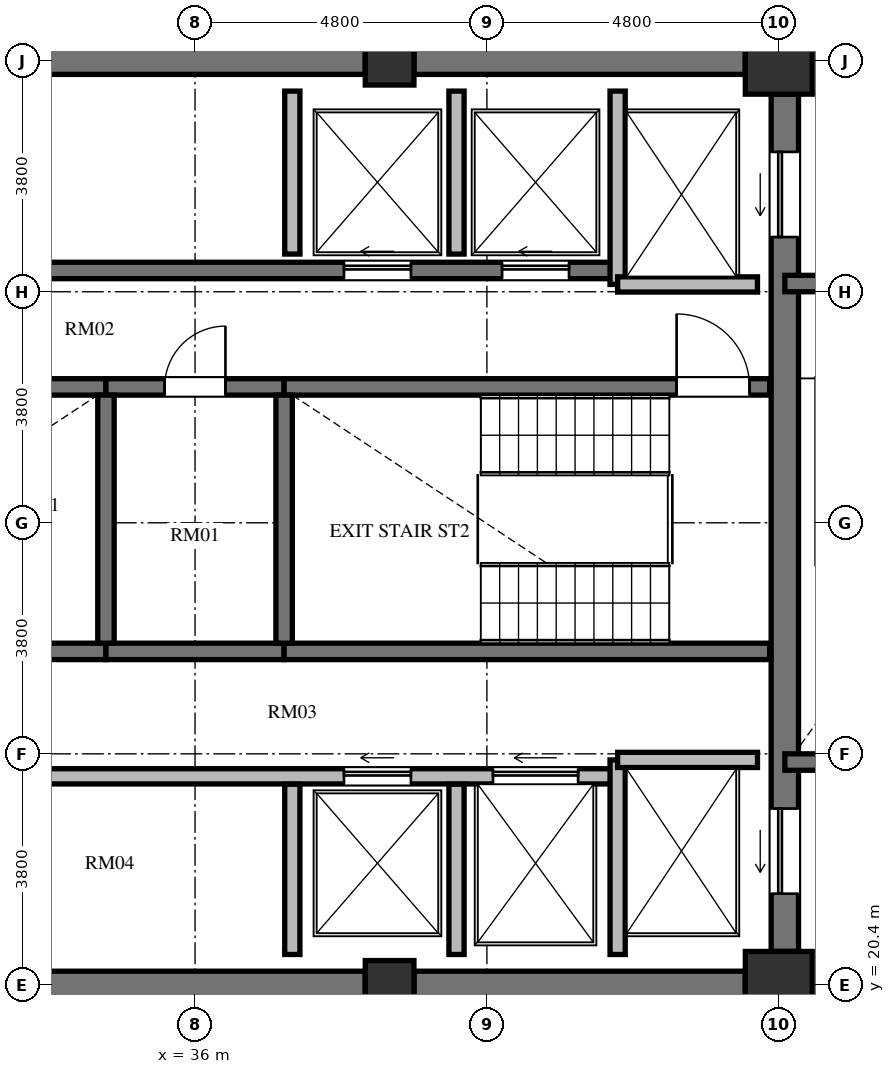
"""IFC4 building model, lengths in metres.
Left out: names, types, materials, properties, quantities, classifications, styles, units other than length and angle.
Written with IfcOpenShell. Run it as: python <this file> out.ifc"""

import sys

from ifc_helpers import new_model, si_unit, direction, frame, frame_2d, origin, origin_2d, place, context, subcontext, project, spatial, rectangle, extrude, element, fill, save


model = new_model("IFC4")
c1 = context("Model", 3, precision=1e-05, world=origin(), true_north=direction((0.0, 1.0)))
c2 = subcontext(c1, "Body", "Model", "MODEL_VIEW")
j1 = project(units=[si_unit("LENGTHUNIT", "METRE"), si_unit("PLANEANGLEUNIT", "RADIAN")], contexts=[c1])
p1 = place(None, origin())
s1 = spatial("IfcSite", under=j1, at=p1, CompositionType="ELEMENT")
p2 = place(p1, origin())
s2 = spatial("IfcBuilding", under=s1, at=p2, CompositionType="ELEMENT")
p3 = place(p2, frame((0.0, 0.0, 269.616)))
s3 = spatial("IfcBuildingStorey", under=s2, at=p3, CompositionType="ELEMENT", Elevation=269.616)
p4 = place(p3, frame((39.2, 20.4, 0.0), z_axis=(0.0, 0.0, 1.0), x_axis=(1.0, 0.0, 0.0)))
e1 = element("IfcColumn", 1, at=p4, inside=s3, PredefinedType="COLUMN", context=c2, shape_type="SweptSolid", body=[
    extrude(rectangle(XDim=0.8, YDim=0.8, at=origin_2d()), origin(), (0.0, 0.0, 1.0), 3.648),
])
for number, where, z_axis, x_axis in (
    (2, (45.6, 20.4, 0.0), (0.0, 0.0, 1.0), (1.0, 0.0, 0.0)),
    (3, (45.6, 35.6, 0.0), (0.0, 0.0, 1.0), (1.0, 0.0, 0.0)),
):
    element("IfcColumn", number, at=place(p3, frame(where, z_axis=z_axis, x_axis=x_axis)), inside=s3, PredefinedType="COLUMN", context=c2, shape_type="SweptSolid", body=[
        extrude(rectangle(XDim=1.1, YDim=1.1, at=origin_2d()), origin(), (0.0, 0.0, 1.0), 3.648),
    ])
p5 = place(p3, frame((39.2, 35.6, 0.0), z_axis=(0.0, 0.0, 1.0), x_axis=(1.0, 0.0, 0.0)))
e4 = element("IfcColumn", 4, at=p5, inside=s3, PredefinedType="COLUMN", context=c2, shape_type="SweptSolid", body=[
    extrude(rectangle(XDim=0.8, YDim=0.8, at=origin_2d()), origin(), (0.0, 0.0, 1.0), 3.648),
])
p6 = place(p3, frame((45.7, 20.95, 0.0), z_axis=(0.0, 0.0, 1.0), x_axis=(0.0, 1.0, 0.0)))
e5 = element("IfcWall", 5, at=p6, inside=s3, PredefinedType="SHEAR", context=c2, shape_type="SweptSolid", body=[
    extrude(rectangle(XDim=14.1, YDim=0.45, at=frame_2d((7.05, 0.0))), origin(), (0.0, 0.0, 1.0), 3.648),
])
p7 = place(p6, frame((11.75, 0.0, 0.0)))
e6 = element("IfcOpeningElement", 6, at=p7, cuts=e5, PredefinedType="OPENING", context=c2, shape_type="SweptSolid", body=[
    extrude(rectangle(XDim=1.4, YDim=2.3, at=frame_2d((0.7, 1.15))), frame((0.0, 0.235, 0.0), z_axis=(0.0, -1.0, 0.0), x_axis=(1.0, 0.0, 0.0)), (0.0, 0.0, 1.0), 0.47),
])
p8 = place(p6, frame((0.95, 0.0, 0.0)))
e7 = element("IfcOpeningElement", 7, at=p8, cuts=e5, PredefinedType="OPENING", context=c2, shape_type="SweptSolid", body=[
    extrude(rectangle(XDim=1.4, YDim=2.3, at=frame_2d((0.7, 1.15))), frame((0.0, 0.235, 0.0), z_axis=(0.0, -1.0, 0.0), x_axis=(1.0, 0.0, 0.0)), (0.0, 0.0, 1.0), 0.47),
])
for number, where, z_axis, x_axis in (
    (8, (33.2, 20.4, 0.0), (0.0, 0.0, 1.0), (1.0, 0.0, 0.0)),
    (9, (33.2, 35.6, 0.0), (0.0, 0.0, 1.0), (1.0, 0.0, 0.0)),
):
    element("IfcWall", number, at=place(p3, frame(where, z_axis=z_axis, x_axis=x_axis)), inside=s3, PredefinedType="SHEAR", context=c2, shape_type="SweptSolid", body=[
        extrude(rectangle(XDim=5.6, YDim=0.45, at=frame_2d((2.8, 0.0))), origin(), (0.0, 0.0, 1.0), 3.648),
    ])
for number, where, z_axis, x_axis in (
    (10, (39.6, 20.4, 0.0), (0.0, 0.0, 1.0), (1.0, 0.0, 0.0)),
    (11, (39.6, 35.6, 0.0), (0.0, 0.0, 1.0), (1.0, 0.0, 0.0)),
):
    element("IfcWall", number, at=place(p3, frame(where, z_axis=z_axis, x_axis=x_axis)), inside=s3, PredefinedType="SHEAR", context=c2, shape_type="SweptSolid", body=[
        extrude(rectangle(XDim=5.45, YDim=0.45, at=frame_2d((2.725, 0.0))), origin(), (0.0, 0.0, 1.0), 3.648),
    ])
p9 = place(p3, frame((26.55, 30.235, 0.0), z_axis=(0.0, 0.0, 1.0), x_axis=(1.0, 0.0, 0.0)))
e12 = element("IfcWall", 12, at=p9, inside=s3, PredefinedType="SHEAR", context=c2, shape_type="SweptSolid", body=[
    extrude(rectangle(XDim=7.985, YDim=0.27, at=frame_2d((3.992, 0.0))), origin(), (0.0, 0.0, 1.0), 3.648),
])
p10 = place(p3, frame((34.535, 30.235, 0.0), z_axis=(0.0, 0.0, 1.0), x_axis=(1.0, 0.0, 0.0)))
e13 = element("IfcWall", 13, at=p10, inside=s3, PredefinedType="SHEAR", context=c2, shape_type="SweptSolid", body=[
    extrude(rectangle(XDim=2.93, YDim=0.27, at=frame_2d((1.465, 0.0))), origin(), (0.0, 0.0, 1.0), 3.648),
])
p11 = place(p10, frame((0.965, 0.0, 0.0)))
e14 = element("IfcOpeningElement", 14, at=p11, cuts=e13, PredefinedType="OPENING", context=c2, shape_type="SweptSolid", body=[
    extrude(rectangle(XDim=1.0, YDim=2.1, at=frame_2d((0.5, 1.05))), frame((0.0, 0.145, 0.0), z_axis=(0.0, -1.0, 0.0), x_axis=(1.0, 0.0, 0.0)), (0.0, 0.0, 1.0), 0.29),
])
p12 = place(p3, frame((37.465, 30.235, 0.0), z_axis=(0.0, 0.0, 1.0), x_axis=(1.0, 0.0, 0.0)))
e15 = element("IfcWall", 15, at=p12, inside=s3, PredefinedType="SHEAR", context=c2, shape_type="SweptSolid", body=[
    extrude(rectangle(XDim=7.985, YDim=0.27, at=frame_2d((3.992, 0.0))), origin(), (0.0, 0.0, 1.0), 3.648),
])
p13 = place(p12, frame((6.455, 0.0, 0.0)))
e16 = element("IfcOpeningElement", 16, at=p13, cuts=e15, PredefinedType="OPENING", context=c2, shape_type="SweptSolid", body=[
    extrude(rectangle(XDim=1.2, YDim=2.15, at=frame_2d((0.6, 1.075))), frame((0.0, 0.145, 0.0), z_axis=(0.0, -1.0, 0.0), x_axis=(1.0, 0.0, 0.0)), (0.0, 0.0, 1.0), 0.29),
])
p14 = place(p3, frame((26.55, 25.885, 0.0), z_axis=(0.0, 0.0, 1.0), x_axis=(1.0, 0.0, 0.0)))
e17 = element("IfcWall", 17, at=p14, inside=s3, PredefinedType="SHEAR", context=c2, shape_type="SweptSolid", body=[
    extrude(rectangle(XDim=7.985, YDim=0.27, at=frame_2d((3.992, 0.0))), origin(), (0.0, 0.0, 1.0), 3.648),
])
p15 = place(p3, frame((34.535, 25.885, 0.0), z_axis=(0.0, 0.0, 1.0), x_axis=(1.0, 0.0, 0.0)))
e18 = element("IfcWall", 18, at=p15, inside=s3, PredefinedType="SHEAR", context=c2, shape_type="SweptSolid", body=[
    extrude(rectangle(XDim=2.93, YDim=0.27, at=frame_2d((1.465, 0.0))), origin(), (0.0, 0.0, 1.0), 3.648),
])
p16 = place(p3, frame((37.465, 25.885, 0.0), z_axis=(0.0, 0.0, 1.0), x_axis=(1.0, 0.0, 0.0)))
e19 = element("IfcWall", 19, at=p16, inside=s3, PredefinedType="SHEAR", context=c2, shape_type="SweptSolid", body=[
    extrude(rectangle(XDim=7.985, YDim=0.27, at=frame_2d((3.992, 0.0))), origin(), (0.0, 0.0, 1.0), 3.648),
])
for number, where, z_axis, x_axis in (
    (20, (34.535, 26.02, 0.0), (0.0, 0.0, 1.0), (0.0, 1.0, 0.0)),
    (21, (37.465, 26.02, 0.0), (0.0, 0.0, 1.0), (0.0, 1.0, 0.0)),
):
    element("IfcWall", number, at=place(p3, frame(where, z_axis=z_axis, x_axis=x_axis)), inside=s3, PredefinedType="SHEAR", context=c2, shape_type="SweptSolid", body=[
        extrude(rectangle(XDim=4.08, YDim=0.27, at=frame_2d((2.04, 0.0))), origin(), (0.0, 0.0, 1.0), 3.648),
    ])
p17 = place(p3, frame((26.55, 32.15, 0.0), z_axis=(0.0, 0.0, 1.0), x_axis=(1.0, 0.0, 0.0)))
e22 = element("IfcWall", 22, at=p17, inside=s3, PredefinedType="SHEAR", context=c2, shape_type="SweptSolid", body=[
    extrude(rectangle(XDim=16.4, YDim=0.27, at=frame_2d((8.2, 0.0))), origin(), (0.0, 0.0, 1.0), 3.648),
])
p18 = place(p17, frame((5.125, 0.0, 0.0)))
e23 = element("IfcOpeningElement", 23, at=p18, cuts=e22, PredefinedType="OPENING", context=c2, shape_type="SweptSolid", body=[
    extrude(rectangle(XDim=1.05, YDim=2.15, at=frame_2d((0.525, 1.075))), frame((0.0, 0.145, 0.0), z_axis=(0.0, -1.0, 0.0), x_axis=(1.0, 0.0, 0.0)), (0.0, 0.0, 1.0), 0.29),
])
p19 = place(p17, frame((11.9, 0.0, 0.0)))
e24 = element("IfcOpeningElement", 24, at=p19, cuts=e22, PredefinedType="OPENING", context=c2, shape_type="SweptSolid", body=[
    extrude(rectangle(XDim=1.1, YDim=2.2, at=frame_2d((0.55, 1.1))), frame((0.0, 0.145, 0.0), z_axis=(0.0, -1.0, 0.0), x_axis=(1.0, 0.0, 0.0)), (0.0, 0.0, 1.0), 0.29),
])
p20 = place(p17, frame((14.5, 0.0, 0.0)))
e25 = element("IfcOpeningElement", 25, at=p20, cuts=e22, PredefinedType="OPENING", context=c2, shape_type="SweptSolid", body=[
    extrude(rectangle(XDim=1.1, YDim=2.2, at=frame_2d((0.55, 1.1))), frame((0.0, 0.145, 0.0), z_axis=(0.0, -1.0, 0.0), x_axis=(1.0, 0.0, 0.0)), (0.0, 0.0, 1.0), 0.29),
])
p21 = place(p3, frame((26.75, 23.83, 0.0), z_axis=(0.0, 0.0, 1.0), x_axis=(1.0, 0.0, 0.0)))
e26 = element("IfcWall", 26, at=p21, inside=s3, PredefinedType="SOLIDWALL", context=c2, shape_type="SweptSolid", body=[
    extrude(rectangle(XDim=16.2, YDim=0.25, at=frame_2d((8.1, 0.0))), origin(), (0.0, 0.0, 1.0), 3.448),
])
p22 = place(p21, frame((4.75, 0.0, 0.0)))
e27 = element("IfcOpeningElement", 27, at=p22, cuts=e26, PredefinedType="OPENING", context=c2, shape_type="SweptSolid", body=[
    extrude(rectangle(XDim=1.4, YDim=2.2, at=frame_2d((0.7, 1.1))), frame((0.0, 0.135, 0.0), z_axis=(0.0, -1.0, 0.0), x_axis=(1.0, 0.0, 0.0)), (0.0, 0.0, 1.0), 0.27),
])
p23 = place(p21, frame((11.7, 0.0, 0.0)))
e28 = element("IfcOpeningElement", 28, at=p23, cuts=e26, PredefinedType="OPENING", context=c2, shape_type="SweptSolid", body=[
    extrude(rectangle(XDim=1.1, YDim=2.2, at=frame_2d((0.55, 1.1))), frame((0.0, 0.135, 0.0), z_axis=(0.0, -1.0, 0.0), x_axis=(1.0, 0.0, 0.0)), (0.0, 0.0, 1.0), 0.27),
])
p24 = place(p21, frame((14.15, 0.0, 0.0)))
e29 = element("IfcOpeningElement", 29, at=p24, cuts=e26, PredefinedType="OPENING", context=c2, shape_type="SweptSolid", body=[
    extrude(rectangle(XDim=1.4, YDim=2.3, at=frame_2d((0.7, 1.15))), frame((0.0, 0.135, 0.0), z_axis=(0.0, -1.0, 0.0), x_axis=(1.0, 0.0, 0.0)), (0.0, 0.0, 1.0), 0.27),
])
p25 = place(p3, frame((42.95, 31.92, 0.0), z_axis=(0.0, 0.0, 1.0), x_axis=(0.0, 1.0, 0.0)))
e30 = element("IfcWall", 30, at=p25, inside=s3, PredefinedType="SOLIDWALL", context=c2, shape_type="SweptSolid", body=[
    extrude(rectangle(XDim=3.18, YDim=0.25, at=frame_2d((1.59, 0.0))), origin(), (0.0, 0.0, 1.0), 3.448),
])
p26 = place(p3, frame((42.95, 31.92, 0.0), z_axis=(0.0, 0.0, 1.0), x_axis=(1.0, 0.0, 0.0)))
e31 = element("IfcWall", 31, at=p26, inside=s3, PredefinedType="SOLIDWALL", context=c2, shape_type="SweptSolid", body=[
    extrude(rectangle(XDim=2.3, YDim=0.25, at=frame_2d((1.15, 0.0))), origin(), (0.0, 0.0, 1.0), 3.448),
])
p27 = place(p3, frame((42.95, 20.9, 0.0), z_axis=(0.0, 0.0, 1.0), x_axis=(0.0, 1.0, 0.0)))
e32 = element("IfcWall", 32, at=p27, inside=s3, PredefinedType="SOLIDWALL", context=c2, shape_type="SweptSolid", body=[
    extrude(rectangle(XDim=3.2, YDim=0.25, at=frame_2d((1.6, 0.0))), origin(), (0.0, 0.0, 1.0), 3.448),
])
p28 = place(p3, frame((42.95, 24.1, 0.0), z_axis=(0.0, 0.0, 1.0), x_axis=(1.0, 0.0, 0.0)))
e33 = element("IfcWall", 33, at=p28, inside=s3, PredefinedType="SOLIDWALL", context=c2, shape_type="SweptSolid", body=[
    extrude(rectangle(XDim=2.3, YDim=0.25, at=frame_2d((1.15, 0.0))), origin(), (0.0, 0.0, 1.0), 3.448),
])
p29 = place(p3, frame((37.6, 32.42, 0.0), z_axis=(0.0, 0.0, 1.0), x_axis=(0.0, 1.0, 0.0)))
e34 = element("IfcWall", 34, at=p29, inside=s3, PredefinedType="SOLIDWALL", context=c2, shape_type="SweptSolid", body=[
    extrude(rectangle(XDim=2.68, YDim=0.25, at=frame_2d((1.34, 0.0))), origin(), (0.0, 0.0, 1.0), 3.448),
])
p30 = place(p3, frame((37.6, 20.9, 0.0), z_axis=(0.0, 0.0, 1.0), x_axis=(0.0, 1.0, 0.0)))
e35 = element("IfcWall", 35, at=p30, inside=s3, PredefinedType="SOLIDWALL", context=c2, shape_type="SweptSolid", body=[
    extrude(rectangle(XDim=2.8, YDim=0.25, at=frame_2d((1.4, 0.0))), origin(), (0.0, 0.0, 1.0), 3.448),
])
p31 = place(p3, frame((40.3, 32.42, 0.0), z_axis=(0.0, 0.0, 1.0), x_axis=(0.0, 1.0, 0.0)))
e36 = element("IfcWall", 36, at=p31, inside=s3, PredefinedType="SOLIDWALL", context=c2, shape_type="SweptSolid", body=[
    extrude(rectangle(XDim=2.68, YDim=0.25, at=frame_2d((1.34, 0.0))), origin(), (0.0, 0.0, 1.0), 3.448),
])
p32 = place(p3, frame((40.3, 20.9, 0.0), z_axis=(0.0, 0.0, 1.0), x_axis=(0.0, 1.0, 0.0)))
e37 = element("IfcWall", 37, at=p32, inside=s3, PredefinedType="SOLIDWALL", context=c2, shape_type="SweptSolid", body=[
    extrude(rectangle(XDim=2.8, YDim=0.25, at=frame_2d((1.4, 0.0))), origin(), (0.0, 0.0, 1.0), 3.448),
])
for number, where, z_axis, x_axis in (
    (38, (45.7, 31.935, 0.0), (0.0, 0.0, 1.0), (1.0, 0.0, 0.0)),
    (39, (45.7, 24.065, 0.0), (0.0, 0.0, 1.0), (1.0, 0.0, 0.0)),
):
    element("IfcWall", number, at=place(p3, frame(where, z_axis=z_axis, x_axis=x_axis)), inside=s3, PredefinedType="SHEAR", context=c2, shape_type="SweptSolid", body=[
        extrude(rectangle(XDim=4.715, YDim=0.27, at=frame_2d((2.357, 0.0))), origin(), (0.0, 0.0, 1.0), 3.648),
    ])
p33 = place(p13, origin())
e40 = element("IfcDoor", 40, at=p33, inside=s3, OperationType="SINGLE_SWING_LEFT", PredefinedType="DOOR", context=c2, shape_type="SweptSolid", body=[
    extrude(rectangle(XDim=1.2, YDim=2.15, at=frame_2d((0.6, 1.075))), frame((0.0, 0.025, 0.0), z_axis=(0.0, -1.0, 0.0), x_axis=(1.0, 0.0, 0.0)), (0.0, 0.0, 1.0), 0.05),
])
fill(e16, e40)
p34 = place(p11, origin())
e41 = element("IfcDoor", 41, at=p34, inside=s3, OperationType="SINGLE_SWING_RIGHT", PredefinedType="DOOR", context=c2, shape_type="SweptSolid", body=[
    extrude(rectangle(XDim=1.0, YDim=2.1, at=frame_2d((0.5, 1.05))), frame((0.0, 0.025, 0.0), z_axis=(0.0, -1.0, 0.0), x_axis=(1.0, 0.0, 0.0)), (0.0, 0.0, 1.0), 0.05),
])
fill(e14, e41)
p35 = place(p19, origin())
e42 = element("IfcDoor", 42, at=p35, inside=s3, OperationType="SLIDING_TO_LEFT", PredefinedType="DOOR", context=c2, shape_type="SweptSolid", body=[
    extrude(rectangle(XDim=1.1, YDim=2.2, at=frame_2d((0.55, 1.1))), frame((0.0, 0.025, 0.0), z_axis=(0.0, -1.0, 0.0), x_axis=(1.0, 0.0, 0.0)), (0.0, 0.0, 1.0), 0.05),
])
fill(e24, e42)
p36 = place(p20, origin())
e43 = element("IfcDoor", 43, at=p36, inside=s3, OperationType="SLIDING_TO_LEFT", PredefinedType="DOOR", context=c2, shape_type="SweptSolid", body=[
    extrude(rectangle(XDim=1.1, YDim=2.2, at=frame_2d((0.55, 1.1))), frame((0.0, 0.025, 0.0), z_axis=(0.0, -1.0, 0.0), x_axis=(1.0, 0.0, 0.0)), (0.0, 0.0, 1.0), 0.05),
])
fill(e25, e43)
p37 = place(p23, origin())
e44 = element("IfcDoor", 44, at=p37, inside=s3, OperationType="SLIDING_TO_LEFT", PredefinedType="DOOR", context=c2, shape_type="SweptSolid", body=[
    extrude(rectangle(XDim=1.1, YDim=2.2, at=frame_2d((0.55, 1.1))), frame((0.0, 0.025, 0.0), z_axis=(0.0, -1.0, 0.0), x_axis=(1.0, 0.0, 0.0)), (0.0, 0.0, 1.0), 0.05),
])
fill(e28, e44)
p38 = place(p7, origin())
e45 = element("IfcDoor", 45, at=p38, inside=s3, OperationType="SLIDING_TO_LEFT", PredefinedType="DOOR", context=c2, shape_type="SweptSolid", body=[
    extrude(rectangle(XDim=1.4, YDim=2.3, at=frame_2d((0.7, 1.15))), frame((0.0, 0.025, 0.0), z_axis=(0.0, -1.0, 0.0), x_axis=(1.0, 0.0, 0.0)), (0.0, 0.0, 1.0), 0.05),
])
fill(e6, e45)
p39 = place(p8, origin())
e46 = element("IfcDoor", 46, at=p39, inside=s3, OperationType="SLIDING_TO_LEFT", PredefinedType="DOOR", context=c2, shape_type="SweptSolid", body=[
    extrude(rectangle(XDim=1.4, YDim=2.3, at=frame_2d((0.7, 1.15))), frame((0.0, 0.025, 0.0), z_axis=(0.0, -1.0, 0.0), x_axis=(1.0, 0.0, 0.0)), (0.0, 0.0, 1.0), 0.05),
])
fill(e7, e46)
p40 = place(p24, origin())
e47 = element("IfcDoor", 47, at=p40, inside=s3, OperationType="SLIDING_TO_LEFT", PredefinedType="DOOR", context=c2, shape_type="SweptSolid", body=[
    extrude(rectangle(XDim=1.4, YDim=2.3, at=frame_2d((0.7, 1.15))), frame((0.0, 0.025, 0.0), z_axis=(0.0, -1.0, 0.0), x_axis=(1.0, 0.0, 0.0)), (0.0, 0.0, 1.0), 0.05),
])
fill(e29, e47)
save(model, sys.argv[1])
